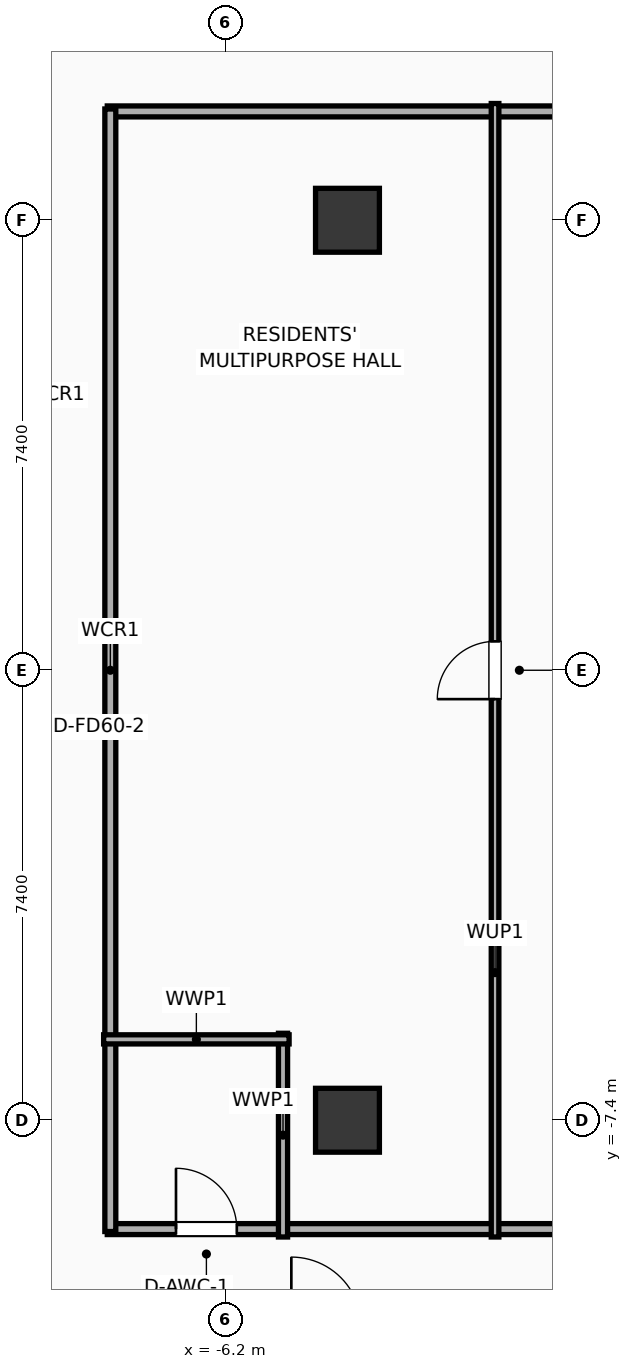
"""IFC4 building model, lengths in metres.
Left out: names, types, materials, properties, quantities, classifications, styles, units other than length and angle.
Written with IfcOpenShell. Run it as: python <this file> out.ifc"""

import sys

from ifc_helpers import new_model, si_unit, direction, frame, frame_2d, origin, origin_2d, place, context, subcontext, project, spatial, rectangle, extrude, element, fill, save


model = new_model("IFC4")
c1 = context("Model", 3, precision=1e-05, world=origin(), true_north=direction((0.0, 1.0)))
c2 = subcontext(c1, "Body", "Model", "MODEL_VIEW")
j1 = project(units=[si_unit("LENGTHUNIT", "METRE"), si_unit("PLANEANGLEUNIT", "RADIAN")], contexts=[c1])
p1 = place(None, origin())
s1 = spatial("IfcSite", under=j1, at=p1, CompositionType="ELEMENT")
p2 = place(p1, origin())
s2 = spatial("IfcBuilding", under=s1, at=p2, CompositionType="ELEMENT")
p3 = place(p2, frame((0.0, 0.0, 53.3)))
s3 = spatial("IfcBuildingStorey", under=s2, at=p3, CompositionType="ELEMENT", Elevation=53.3)
for number, where, z_axis, x_axis in (
    (1, (-4.2, -7.4, 0.0), (0.0, 0.0, 1.0), (1.0, 0.0, 0.0)),
    (2, (-4.2, 7.4, 0.0), (0.0, 0.0, 1.0), (1.0, 0.0, 0.0)),
):
    element("IfcColumn", number, at=place(p3, frame(where, z_axis=z_axis, x_axis=x_axis)), inside=s3, PredefinedType="COLUMN", context=c2, shape_type="SweptSolid", body=[
        extrude(rectangle(XDim=1.05, YDim=1.05, at=origin_2d()), origin(), (0.0, 0.0, 1.0), 3.9),
    ])
p4 = place(p3, frame((-8.15, 9.19, 0.0), z_axis=(0.0, 0.0, 1.0), x_axis=(1.0, 0.0, 0.0)))
e3 = element("IfcWall", 3, at=p4, inside=s3, PredefinedType="PARTITIONING", context=c2, shape_type="SweptSolid", body=[
    extrude(rectangle(XDim=16.3, YDim=0.18, at=frame_2d((8.15, 0.0))), origin(), (0.0, 0.0, 1.0), 3.65),
])
p5 = place(p4, frame((8.49, 0.0, 0.0)))
e4 = element("IfcOpeningElement", 4, at=p5, cuts=e3, PredefinedType="OPENING", context=c2, shape_type="SweptSolid", body=[
    extrude(rectangle(XDim=0.95, YDim=2.05, at=frame_2d((0.475, 1.025))), frame((0.0, 0.1, 0.0), z_axis=(0.0, -1.0, 0.0), x_axis=(1.0, 0.0, 0.0)), (0.0, 0.0, 1.0), 0.2),
])
p6 = place(p3, frame((-8.15, -9.19, 0.0), z_axis=(0.0, 0.0, 1.0), x_axis=(1.0, 0.0, 0.0)))
e5 = element("IfcWall", 5, at=p6, inside=s3, PredefinedType="PARTITIONING", context=c2, shape_type="SweptSolid", body=[
    extrude(rectangle(XDim=16.3, YDim=0.18, at=frame_2d((8.15, 0.0))), origin(), (0.0, 0.0, 1.0), 3.65),
])
p7 = place(p6, frame((1.13, 0.0, 0.0)))
e6 = element("IfcOpeningElement", 6, at=p7, cuts=e5, PredefinedType="OPENING", context=c2, shape_type="SweptSolid", body=[
    extrude(rectangle(XDim=1.0, YDim=2.05, at=frame_2d((0.5, 1.025))), frame((0.0, 0.1, 0.0), z_axis=(0.0, -1.0, 0.0), x_axis=(1.0, 0.0, 0.0)), (0.0, 0.0, 1.0), 0.2),
])
p8 = place(p6, frame((10.12, 0.0, 0.0)))
e7 = element("IfcOpeningElement", 7, at=p8, cuts=e5, PredefinedType="OPENING", context=c2, shape_type="SweptSolid", body=[
    extrude(rectangle(XDim=0.95, YDim=2.05, at=frame_2d((0.475, 1.025))), frame((0.0, 0.1, 0.0), z_axis=(0.0, -1.0, 0.0), x_axis=(1.0, 0.0, 0.0)), (0.0, 0.0, 1.0), 0.2),
])
p9 = place(p3, frame((-8.1, -9.23, 0.0), z_axis=(0.0, 0.0, 1.0), x_axis=(0.0, 1.0, 0.0)))
e8 = element("IfcWall", 8, at=p9, inside=s3, PredefinedType="PARTITIONING", context=c2, shape_type="SweptSolid", body=[
    extrude(rectangle(XDim=18.46, YDim=0.18, at=frame_2d((9.23, 0.0))), origin(), (0.0, 0.0, 1.0), 3.65),
])
p10 = place(p3, frame((-5.26, -9.32, 0.0), z_axis=(0.0, 0.0, 1.0), x_axis=(0.0, 1.0, 0.0)))
e9 = element("IfcWall", 9, at=p10, inside=s3, PredefinedType="PLUMBINGWALL", context=c2, shape_type="SweptSolid", body=[
    extrude(rectangle(XDim=3.35, YDim=0.15, at=frame_2d((1.675, 0.0))), origin(), (0.0, 0.0, 1.0), 3.65),
])
p11 = place(p3, frame((-8.21, -6.07, 0.0), z_axis=(0.0, 0.0, 1.0), x_axis=(1.0, 0.0, 0.0)))
e10 = element("IfcWall", 10, at=p11, inside=s3, PredefinedType="PLUMBINGWALL", context=c2, shape_type="SweptSolid", body=[
    extrude(rectangle(XDim=3.05, YDim=0.15, at=frame_2d((1.525, 0.0))), origin(), (0.0, 0.0, 1.0), 3.65),
])
p12 = place(p3, frame((-1.773, -9.32, 0.0), z_axis=(0.0, 0.0, 1.0), x_axis=(0.0, 1.0, 0.0)))
e11 = element("IfcWall", 11, at=p12, inside=s3, PredefinedType="PARTITIONING", context=c2, shape_type="SweptSolid", body=[
    extrude(rectangle(XDim=18.64, YDim=0.125, at=frame_2d((9.32, 0.0))), origin(), (0.0, 0.0, 1.0), 3.65),
])
p13 = place(p12, frame((8.845, 0.0, 0.0)))
e12 = element("IfcOpeningElement", 12, at=p13, cuts=e11, PredefinedType="OPENING", context=c2, shape_type="SweptSolid", body=[
    extrude(rectangle(XDim=0.95, YDim=2.05, at=frame_2d((0.475, 1.025))), frame((0.0, 0.073, 0.0), z_axis=(0.0, -1.0, 0.0), x_axis=(1.0, 0.0, 0.0)), (0.0, 0.0, 1.0), 0.145),
])
p14 = place(p7, origin())
e13 = element("IfcDoor", 13, at=p14, inside=s3, OperationType="SINGLE_SWING_LEFT", PredefinedType="DOOR", context=c2, shape_type="SweptSolid", body=[
    extrude(rectangle(XDim=1.0, YDim=2.05, at=frame_2d((0.5, 1.025))), frame((0.0, 0.025, 0.0), z_axis=(0.0, -1.0, 0.0), x_axis=(1.0, 0.0, 0.0)), (0.0, 0.0, 1.0), 0.05),
])
fill(e6, e13)
p15 = place(p13, origin())
e14 = element("IfcDoor", 14, at=p15, inside=s3, OperationType="SINGLE_SWING_LEFT", PredefinedType="DOOR", context=c2, shape_type="SweptSolid", body=[
    extrude(rectangle(XDim=0.95, YDim=2.05, at=frame_2d((0.475, 1.025))), frame((0.0, 0.025, 0.0), z_axis=(0.0, -1.0, 0.0), x_axis=(1.0, 0.0, 0.0)), (0.0, 0.0, 1.0), 0.05),
])
fill(e12, e14)
save(model, sys.argv[1])
